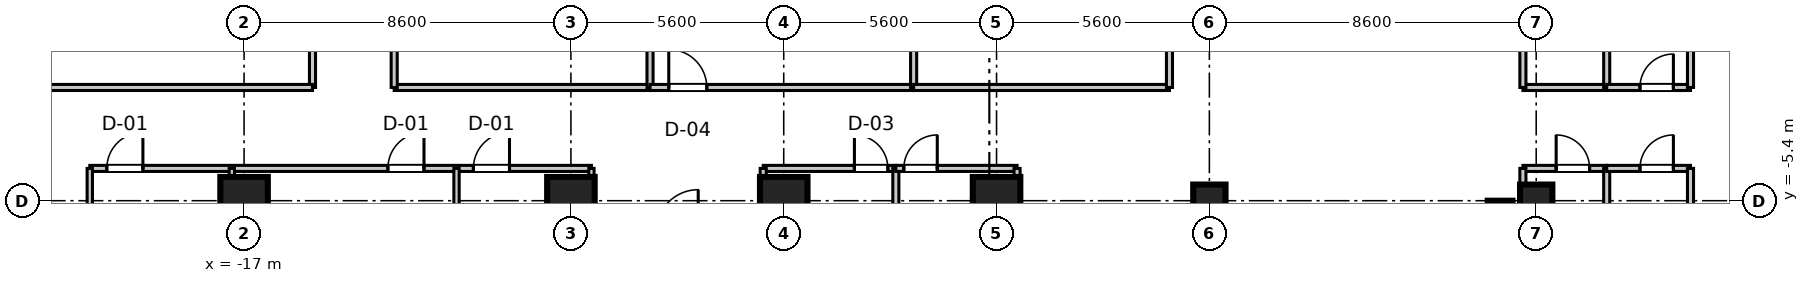
"""IFC4 building model, lengths in metres.
Left out: names, types, materials, properties, quantities, classifications, styles, units other than length and angle.
Written with IfcOpenShell. Run it as: python <this file> out.ifc"""

import sys

from ifc_helpers import new_model, si_unit, direction, frame, frame_2d, origin, origin_2d, place, context, subcontext, project, spatial, rectangle, extrude, source, transform, mapped, element, fill, save


model = new_model("IFC4")
c1 = context("Model", 3, precision=1e-05, world=origin(), true_north=direction((0.0, 1.0)))
c2 = subcontext(c1, "Body", "Model", "MODEL_VIEW")
j1 = project(units=[si_unit("LENGTHUNIT", "METRE"), si_unit("PLANEANGLEUNIT", "RADIAN")], contexts=[c1])
p1 = place(None, origin())
s1 = spatial("IfcSite", under=j1, at=p1, CompositionType="ELEMENT")
p2 = place(p1, origin())
s2 = spatial("IfcBuilding", under=s1, at=p2, CompositionType="ELEMENT")
p3 = place(p2, frame((0.0, 0.0, 102.9)))
s3 = spatial("IfcBuildingStorey", under=s2, at=p3, CompositionType="ELEMENT", Elevation=102.9)
m1 = source(origin(), c2, "Body", "SweptSolid", [
    extrude(rectangle(XDim=1.25, YDim=1.25, at=origin_2d()), origin(), (0.0, 0.0, 1.0), 3.605),
])
for number, where, z_axis, x_axis in (
    (1, (-17.0, -5.4, 0.0), (0.0, 0.0, 1.0), (1.0, 0.0, 0.0)),
    (2, (-8.4, -5.4, 0.0), (0.0, 0.0, 1.0), (1.0, 0.0, 0.0)),
    (3, (-2.8, -5.4, 0.0), (0.0, 0.0, 1.0), (1.0, 0.0, 0.0)),
    (4, (2.8, -5.4, 0.0), (0.0, 0.0, 1.0), (1.0, 0.0, 0.0)),
):
    element("IfcColumn", number, at=place(p3, frame(where, z_axis=z_axis, x_axis=x_axis)), inside=s3, PredefinedType="COLUMN", context=c2, shape_type="MappedRepresentation", body=[
        mapped(m1, transform((0.0, 0.0, 0.0), scale=1.0)),
    ])
m2 = source(origin(), c2, "Body", "SweptSolid", [
    extrude(rectangle(XDim=0.85, YDim=0.85, at=origin_2d()), origin(), (0.0, 0.0, 1.0), 3.605),
])
for number, where, z_axis, x_axis in (
    (5, (8.4, -5.4, 0.0), (0.0, 0.0, 1.0), (1.0, 0.0, 0.0)),
    (6, (17.0, -5.4, 0.0), (0.0, 0.0, 1.0), (1.0, 0.0, 0.0)),
):
    element("IfcColumn", number, at=place(p3, frame(where, z_axis=z_axis, x_axis=x_axis)), inside=s3, PredefinedType="PILASTER", context=c2, shape_type="MappedRepresentation", body=[
        mapped(m2, transform((0.0, 0.0, 0.0), scale=1.0)),
    ])
m3 = source(origin(), c2, "Body", "SweptSolid", [
    extrude(rectangle(XDim=11.6, YDim=0.65, at=frame_2d((5.8, 0.0))), origin(), (0.0, 0.0, 1.0), 3.38),
])
p4 = place(p3, frame((16.05, -17.0, 0.0), z_axis=(0.0, 0.0, 1.0), x_axis=(0.0, 1.0, 0.0)))
e7 = element("IfcWall", 7, at=p4, inside=s3, PredefinedType="SHEAR", context=c2, shape_type="MappedRepresentation", body=[
    mapped(m3, transform((0.0, 0.0, 0.0), scale=1.0)),
])
m4 = source(origin(), c2, "Body", "SweptSolid", [
    extrude(rectangle(XDim=2.205, YDim=0.16, at=frame_2d((1.103, 0.0))), origin(), (0.0, 0.0, 1.0), 2.72),
])
p5 = place(p3, frame((16.65, -4.55, 0.0), z_axis=(0.0, 0.0, 1.0), x_axis=(1.0, 0.0, 0.0)))
e8 = element("IfcWall", 8, at=p5, inside=s3, PredefinedType="PARTITIONING", context=c2, shape_type="MappedRepresentation", body=[
    mapped(m4, transform((0.0, 0.0, 0.0), scale=1.0)),
])
p6 = place(p5, frame((0.875, 0.0, 0.0)))
e9 = element("IfcOpeningElement", 9, at=p6, cuts=e8, PredefinedType="OPENING", context=c2, shape_type="SweptSolid", body=[
    extrude(rectangle(XDim=0.88, YDim=2.1, at=frame_2d((0.44, 1.05))), frame((0.0, 0.09, 0.0), z_axis=(0.0, -1.0, 0.0), x_axis=(1.0, 0.0, 0.0)), (0.0, 0.0, 1.0), 0.18),
])
m5 = source(origin(), c2, "Body", "SweptSolid", [
    extrude(rectangle(XDim=19.25, YDim=0.16, at=frame_2d((9.625, 0.0))), origin(), (0.0, 0.0, 1.0), 2.72),
])
for number, where, z_axis, x_axis in (
    (10, (16.65, -23.8, 0.0), (0.0, 0.0, 1.0), (0.0, 1.0, 0.0)),
    (11, (18.855, -23.8, 0.0), (0.0, 0.0, 1.0), (0.0, 1.0, 0.0)),
):
    element("IfcWall", number, at=place(p3, frame(where, z_axis=z_axis, x_axis=x_axis)), inside=s3, PredefinedType="PARTITIONING", context=c2, shape_type="MappedRepresentation", body=[
        mapped(m5, transform((0.0, 0.0, 0.0), scale=1.0)),
    ])
p7 = place(p3, frame((18.855, -4.55, 0.0), z_axis=(0.0, 0.0, 1.0), x_axis=(1.0, 0.0, 0.0)))
e12 = element("IfcWall", 12, at=p7, inside=s3, PredefinedType="PARTITIONING", context=c2, shape_type="MappedRepresentation", body=[
    mapped(m4, transform((0.0, 0.0, 0.0), scale=1.0)),
])
p8 = place(p7, frame((0.875, 0.0, 0.0)))
e13 = element("IfcOpeningElement", 13, at=p8, cuts=e12, PredefinedType="OPENING", context=c2, shape_type="SweptSolid", body=[
    extrude(rectangle(XDim=0.88, YDim=2.1, at=frame_2d((0.44, 1.05))), frame((0.0, 0.09, 0.0), z_axis=(0.0, -1.0, 0.0), x_axis=(1.0, 0.0, 0.0)), (0.0, 0.0, 1.0), 0.18),
])
m6 = source(origin(), c2, "Body", "SweptSolid", [
    extrude(rectangle(XDim=17.83, YDim=0.16, at=frame_2d((8.915, 0.0))), origin(), (0.0, 0.0, 1.0), 2.72),
])
p9 = place(p3, frame((21.06, -22.38, 0.0), z_axis=(0.0, 0.0, 1.0), x_axis=(0.0, 1.0, 0.0)))
e14 = element("IfcWall", 14, at=p9, inside=s3, PredefinedType="PARTITIONING", context=c2, shape_type="MappedRepresentation", body=[
    mapped(m6, transform((0.0, 0.0, 0.0), scale=1.0)),
])
m7 = source(origin(), c2, "Body", "SweptSolid", [
    extrude(rectangle(XDim=13.2, YDim=0.16, at=frame_2d((6.6, 0.0))), origin(), (0.0, 0.0, 1.0), 2.72),
])
p10 = place(p3, frame((-21.06, -4.55, 0.0), z_axis=(0.0, 0.0, 1.0), x_axis=(1.0, 0.0, 0.0)))
e15 = element("IfcWall", 15, at=p10, inside=s3, PredefinedType="PARTITIONING", context=c2, shape_type="MappedRepresentation", body=[
    mapped(m7, transform((0.0, 0.0, 0.0), scale=1.0)),
])
p11 = place(p10, frame((0.448, 0.0, 0.0)))
e16 = element("IfcOpeningElement", 16, at=p11, cuts=e15, PredefinedType="OPENING", context=c2, shape_type="SweptSolid", body=[
    extrude(rectangle(XDim=0.95, YDim=2.1, at=frame_2d((0.475, 1.05))), frame((0.0, 0.09, 0.0), z_axis=(0.0, -1.0, 0.0), x_axis=(1.0, 0.0, 0.0)), (0.0, 0.0, 1.0), 0.18),
])
p12 = place(p10, frame((7.844, 0.0, 0.0)))
e17 = element("IfcOpeningElement", 17, at=p12, cuts=e15, PredefinedType="OPENING", context=c2, shape_type="SweptSolid", body=[
    extrude(rectangle(XDim=0.95, YDim=2.1, at=frame_2d((0.475, 1.05))), frame((0.0, 0.09, 0.0), z_axis=(0.0, -1.0, 0.0), x_axis=(1.0, 0.0, 0.0)), (0.0, 0.0, 1.0), 0.18),
])
p13 = place(p10, frame((10.094, 0.0, 0.0)))
e18 = element("IfcOpeningElement", 18, at=p13, cuts=e15, PredefinedType="OPENING", context=c2, shape_type="SweptSolid", body=[
    extrude(rectangle(XDim=0.95, YDim=2.1, at=frame_2d((0.475, 1.05))), frame((0.0, 0.09, 0.0), z_axis=(0.0, -1.0, 0.0), x_axis=(1.0, 0.0, 0.0)), (0.0, 0.0, 1.0), 0.18),
])
m8 = source(origin(), c2, "Body", "SweptSolid", [
    extrude(rectangle(XDim=17.83, YDim=0.14, at=frame_2d((8.915, 0.0))), origin(), (0.0, 0.0, 1.0), 2.72),
])
p14 = place(p3, frame((-21.06, -22.38, 0.0), z_axis=(0.0, 0.0, 1.0), x_axis=(0.0, 1.0, 0.0)))
e19 = element("IfcWall", 19, at=p14, inside=s3, PredefinedType="PARTITIONING", context=c2, shape_type="MappedRepresentation", body=[
    mapped(m8, transform((0.0, 0.0, 0.0), scale=1.0)),
])
m9 = source(origin(), c2, "Body", "SweptSolid", [
    extrude(rectangle(XDim=19.25, YDim=0.14, at=frame_2d((9.625, 0.0))), origin(), (0.0, 0.0, 1.0), 2.72),
])
for number, where, z_axis, x_axis in (
    (20, (-7.86, -23.8, 0.0), (0.0, 0.0, 1.0), (0.0, 1.0, 0.0)),
    (21, (-17.322, -23.8, 0.0), (0.0, 0.0, 1.0), (0.0, 1.0, 0.0)),
    (22, (-11.41, -23.8, 0.0), (0.0, 0.0, 1.0), (0.0, 1.0, 0.0)),
):
    element("IfcWall", number, at=place(p3, frame(where, z_axis=z_axis, x_axis=x_axis)), inside=s3, PredefinedType="PARTITIONING", context=c2, shape_type="MappedRepresentation", body=[
        mapped(m9, transform((0.0, 0.0, 0.0), scale=1.0)),
    ])
m10 = source(origin(), c2, "Body", "SweptSolid", [
    extrude(rectangle(XDim=3.49, YDim=0.16, at=frame_2d((1.745, 0.0))), origin(), (0.0, 0.0, 1.0), 2.72),
])
p15 = place(p3, frame((-3.34, -4.55, 0.0), z_axis=(0.0, 0.0, 1.0), x_axis=(1.0, 0.0, 0.0)))
e23 = element("IfcWall", 23, at=p15, inside=s3, PredefinedType="PARTITIONING", context=c2, shape_type="MappedRepresentation", body=[
    mapped(m10, transform((0.0, 0.0, 0.0), scale=1.0)),
])
p16 = place(p15, frame((2.4, 0.0, 0.0)))
e24 = element("IfcOpeningElement", 24, at=p16, cuts=e23, PredefinedType="OPENING", context=c2, shape_type="SweptSolid", body=[
    extrude(rectangle(XDim=0.88, YDim=2.1, at=frame_2d((0.44, 1.05))), frame((0.0, 0.09, 0.0), z_axis=(0.0, -1.0, 0.0), x_axis=(1.0, 0.0, 0.0)), (0.0, 0.0, 1.0), 0.18),
])
for number, where, z_axis, x_axis in (
    (25, (-3.34, -23.8, 0.0), (0.0, 0.0, 1.0), (0.0, 1.0, 0.0)),
    (26, (0.15, -23.8, 0.0), (0.0, 0.0, 1.0), (0.0, 1.0, 0.0)),
):
    element("IfcWall", number, at=place(p3, frame(where, z_axis=z_axis, x_axis=x_axis)), inside=s3, PredefinedType="PARTITIONING", context=c2, shape_type="MappedRepresentation", body=[
        mapped(m5, transform((0.0, 0.0, 0.0), scale=1.0)),
    ])
m11 = source(origin(), c2, "Body", "SweptSolid", [
    extrude(rectangle(XDim=3.19, YDim=0.16, at=frame_2d((1.595, 0.0))), origin(), (0.0, 0.0, 1.0), 2.72),
])
p17 = place(p3, frame((0.15, -4.55, 0.0), z_axis=(0.0, 0.0, 1.0), x_axis=(1.0, 0.0, 0.0)))
e27 = element("IfcWall", 27, at=p17, inside=s3, PredefinedType="PARTITIONING", context=c2, shape_type="MappedRepresentation", body=[
    mapped(m11, transform((0.0, 0.0, 0.0), scale=1.0)),
])
p18 = place(p17, frame((0.21, 0.0, 0.0)))
e28 = element("IfcOpeningElement", 28, at=p18, cuts=e27, PredefinedType="OPENING", context=c2, shape_type="SweptSolid", body=[
    extrude(rectangle(XDim=0.88, YDim=2.1, at=frame_2d((0.44, 1.05))), frame((0.0, 0.09, 0.0), z_axis=(0.0, -1.0, 0.0), x_axis=(1.0, 0.0, 0.0)), (0.0, 0.0, 1.0), 0.18),
])
p19 = place(p3, frame((3.34, -23.8, 0.0), z_axis=(0.0, 0.0, 1.0), x_axis=(0.0, 1.0, 0.0)))
e29 = element("IfcWall", 29, at=p19, inside=s3, PredefinedType="PARTITIONING", context=c2, shape_type="MappedRepresentation", body=[
    mapped(m5, transform((0.0, 0.0, 0.0), scale=1.0)),
])
m12 = source(origin(), c2, "Body", "SweptSolid", [
    extrude(rectangle(XDim=4.84, YDim=0.16, at=frame_2d((2.42, 0.0))), origin(), (0.0, 0.0, 1.0), 2.72),
])
p20 = place(p3, frame((-15.2, -2.42, 0.0), z_axis=(0.0, 0.0, 1.0), x_axis=(0.0, 1.0, 0.0)))
e30 = element("IfcWall", 30, at=p20, inside=s3, PredefinedType="PARTITIONING", context=c2, shape_type="MappedRepresentation", body=[
    mapped(m12, transform((0.0, 0.0, 0.0), scale=1.0)),
])
m13 = source(origin(), c2, "Body", "SweptSolid", [
    extrude(rectangle(XDim=8.6, YDim=0.16, at=frame_2d((4.3, 0.0))), origin(), (0.0, 0.0, 1.0), 2.72),
])
p21 = place(p3, frame((-23.8, -2.42, 0.0), z_axis=(0.0, 0.0, 1.0), x_axis=(1.0, 0.0, 0.0)))
e31 = element("IfcWall", 31, at=p21, inside=s3, PredefinedType="PARTITIONING", context=c2, shape_type="MappedRepresentation", body=[
    mapped(m13, transform((0.0, 0.0, 0.0), scale=1.0)),
])
m14 = source(origin(), c2, "Body", "SweptSolid", [
    extrude(rectangle(XDim=6.732, YDim=0.16, at=frame_2d((3.366, 0.0))), origin(), (0.0, 0.0, 1.0), 2.72),
])
p22 = place(p3, frame((-13.05, -2.42, 0.0), z_axis=(0.0, 0.0, 1.0), x_axis=(1.0, 0.0, 0.0)))
e32 = element("IfcWall", 32, at=p22, inside=s3, PredefinedType="PARTITIONING", context=c2, shape_type="MappedRepresentation", body=[
    mapped(m14, transform((0.0, 0.0, 0.0), scale=1.0)),
])
for number, where, z_axis, x_axis in (
    (33, (-13.05, -2.42, 0.0), (0.0, 0.0, 1.0), (0.0, 1.0, 0.0)),
    (34, (-6.318, -2.42, 0.0), (0.0, 0.0, 1.0), (0.0, 1.0, 0.0)),
):
    element("IfcWall", number, at=place(p3, frame(where, z_axis=z_axis, x_axis=x_axis)), inside=s3, PredefinedType="PARTITIONING", context=c2, shape_type="MappedRepresentation", body=[
        mapped(m12, transform((0.0, 0.0, 0.0), scale=1.0)),
    ])
m15 = source(origin(), c2, "Body", "SweptSolid", [
    extrude(rectangle(XDim=6.936, YDim=0.16, at=frame_2d((3.468, 0.0))), origin(), (0.0, 0.0, 1.0), 2.72),
])
p23 = place(p3, frame((-6.318, -2.42, 0.0), z_axis=(0.0, 0.0, 1.0), x_axis=(1.0, 0.0, 0.0)))
e35 = element("IfcWall", 35, at=p23, inside=s3, PredefinedType="PARTITIONING", context=c2, shape_type="MappedRepresentation", body=[
    mapped(m15, transform((0.0, 0.0, 0.0), scale=1.0)),
])
p24 = place(p23, frame((0.493, 0.0, 0.0)))
e36 = element("IfcOpeningElement", 36, at=p24, cuts=e35, PredefinedType="OPENING", context=c2, shape_type="SweptSolid", body=[
    extrude(rectangle(XDim=1.0, YDim=2.1, at=frame_2d((0.5, 1.05))), frame((0.0, 0.09, 0.0), z_axis=(0.0, -1.0, 0.0), x_axis=(1.0, 0.0, 0.0)), (0.0, 0.0, 1.0), 0.18),
])
p25 = place(p3, frame((0.618, -2.42, 0.0), z_axis=(0.0, 0.0, 1.0), x_axis=(0.0, 1.0, 0.0)))
e37 = element("IfcWall", 37, at=p25, inside=s3, PredefinedType="PARTITIONING", context=c2, shape_type="MappedRepresentation", body=[
    mapped(m12, transform((0.0, 0.0, 0.0), scale=1.0)),
])
m16 = source(origin(), c2, "Body", "SweptSolid", [
    extrude(rectangle(XDim=6.732, YDim=0.16, at=frame_2d((3.366, 0.0))), origin(), (0.0, 0.0, 1.0), 2.72),
])
p26 = place(p3, frame((0.618, -2.42, 0.0), z_axis=(0.0, 0.0, 1.0), x_axis=(1.0, 0.0, 0.0)))
e38 = element("IfcWall", 38, at=p26, inside=s3, PredefinedType="PARTITIONING", context=c2, shape_type="MappedRepresentation", body=[
    mapped(m16, transform((0.0, 0.0, 0.0), scale=1.0)),
])
p27 = place(p3, frame((7.35, -2.42, 0.0), z_axis=(0.0, 0.0, 1.0), x_axis=(0.0, 1.0, 0.0)))
e39 = element("IfcWall", 39, at=p27, inside=s3, PredefinedType="PARTITIONING", context=c2, shape_type="MappedRepresentation", body=[
    mapped(m12, transform((0.0, 0.0, 0.0), scale=1.0)),
])
p28 = place(p3, frame((16.65, -2.42, 0.0), z_axis=(0.0, 0.0, 1.0), x_axis=(1.0, 0.0, 0.0)))
e40 = element("IfcWall", 40, at=p28, inside=s3, PredefinedType="PARTITIONING", context=c2, shape_type="MappedRepresentation", body=[
    mapped(m4, transform((0.0, 0.0, 0.0), scale=1.0)),
])
for number, where, z_axis, x_axis in (
    (41, (16.65, -2.42, 0.0), (0.0, 0.0, 1.0), (0.0, 1.0, 0.0)),
    (42, (18.855, -2.42, 0.0), (0.0, 0.0, 1.0), (0.0, 1.0, 0.0)),
):
    element("IfcWall", number, at=place(p3, frame(where, z_axis=z_axis, x_axis=x_axis)), inside=s3, PredefinedType="PARTITIONING", context=c2, shape_type="MappedRepresentation", body=[
        mapped(m12, transform((0.0, 0.0, 0.0), scale=1.0)),
    ])
p29 = place(p3, frame((18.855, -2.42, 0.0), z_axis=(0.0, 0.0, 1.0), x_axis=(1.0, 0.0, 0.0)))
e43 = element("IfcWall", 43, at=p29, inside=s3, PredefinedType="PARTITIONING", context=c2, shape_type="MappedRepresentation", body=[
    mapped(m4, transform((0.0, 0.0, 0.0), scale=1.0)),
])
p30 = place(p29, frame((0.875, 0.0, 0.0)))
e44 = element("IfcOpeningElement", 44, at=p30, cuts=e43, PredefinedType="OPENING", context=c2, shape_type="SweptSolid", body=[
    extrude(rectangle(XDim=0.88, YDim=2.1, at=frame_2d((0.44, 1.05))), frame((0.0, 0.09, 0.0), z_axis=(0.0, -1.0, 0.0), x_axis=(1.0, 0.0, 0.0)), (0.0, 0.0, 1.0), 0.18),
])
p31 = place(p3, frame((21.06, -2.42, 0.0), z_axis=(0.0, 0.0, 1.0), x_axis=(0.0, 1.0, 0.0)))
e45 = element("IfcWall", 45, at=p31, inside=s3, PredefinedType="PARTITIONING", context=c2, shape_type="MappedRepresentation", body=[
    mapped(m12, transform((0.0, 0.0, 0.0), scale=1.0)),
])
m17 = source(origin(), c2, "Body", "SweptSolid", [
    extrude(rectangle(XDim=0.88, YDim=2.1, at=frame_2d((0.44, 1.05))), frame((0.0, 0.025, 0.0), z_axis=(0.0, -1.0, 0.0), x_axis=(1.0, 0.0, 0.0)), (0.0, 0.0, 1.0), 0.05),
])
p32 = place(p6, frame((0.88, 0.0, 0.0), z_axis=(0.0, 0.0, 1.0), x_axis=(-1.0, 0.0, 0.0)))
e46 = element("IfcDoor", 46, at=p32, inside=s3, OperationType="SINGLE_SWING_LEFT", PredefinedType="DOOR", context=c2, shape_type="MappedRepresentation", body=[
    mapped(m17, transform((0.0, 0.0, 0.0), scale=1.0)),
])
fill(e9, e46)
p33 = place(p8, frame((0.88, 0.0, 0.0), z_axis=(0.0, 0.0, 1.0), x_axis=(-1.0, 0.0, 0.0)))
e47 = element("IfcDoor", 47, at=p33, inside=s3, OperationType="SINGLE_SWING_RIGHT", PredefinedType="DOOR", context=c2, shape_type="MappedRepresentation", body=[
    mapped(m17, transform((0.0, 0.0, 0.0), scale=1.0)),
])
fill(e13, e47)
m18 = source(origin(), c2, "Body", "SweptSolid", [
    extrude(rectangle(XDim=0.95, YDim=2.1, at=frame_2d((0.475, 1.05))), frame((0.0, 0.025, 0.0), z_axis=(0.0, -1.0, 0.0), x_axis=(1.0, 0.0, 0.0)), (0.0, 0.0, 1.0), 0.05),
])
p34 = place(p11, frame((0.95, 0.0, 0.0), z_axis=(0.0, 0.0, 1.0), x_axis=(-1.0, 0.0, 0.0)))
e48 = element("IfcDoor", 48, at=p34, inside=s3, OperationType="SINGLE_SWING_RIGHT", PredefinedType="DOOR", context=c2, shape_type="MappedRepresentation", body=[
    mapped(m18, transform((0.0, 0.0, 0.0), scale=1.0)),
])
fill(e16, e48)
p35 = place(p12, frame((0.95, 0.0, 0.0), z_axis=(0.0, 0.0, 1.0), x_axis=(-1.0, 0.0, 0.0)))
e49 = element("IfcDoor", 49, at=p35, inside=s3, OperationType="SINGLE_SWING_RIGHT", PredefinedType="DOOR", context=c2, shape_type="MappedRepresentation", body=[
    mapped(m18, transform((0.0, 0.0, 0.0), scale=1.0)),
])
fill(e17, e49)
p36 = place(p13, frame((0.95, 0.0, 0.0), z_axis=(0.0, 0.0, 1.0), x_axis=(-1.0, 0.0, 0.0)))
e50 = element("IfcDoor", 50, at=p36, inside=s3, OperationType="SINGLE_SWING_RIGHT", PredefinedType="DOOR", context=c2, shape_type="MappedRepresentation", body=[
    mapped(m18, transform((0.0, 0.0, 0.0), scale=1.0)),
])
fill(e18, e50)
p37 = place(p16, frame((0.88, 0.0, 0.0), z_axis=(0.0, 0.0, 1.0), x_axis=(-1.0, 0.0, 0.0)))
e51 = element("IfcDoor", 51, at=p37, inside=s3, OperationType="SINGLE_SWING_LEFT", PredefinedType="DOOR", context=c2, shape_type="MappedRepresentation", body=[
    mapped(m17, transform((0.0, 0.0, 0.0), scale=1.0)),
])
fill(e24, e51)
p38 = place(p18, frame((0.88, 0.0, 0.0), z_axis=(0.0, 0.0, 1.0), x_axis=(-1.0, 0.0, 0.0)))
e52 = element("IfcDoor", 52, at=p38, inside=s3, OperationType="SINGLE_SWING_RIGHT", PredefinedType="DOOR", context=c2, shape_type="MappedRepresentation", body=[
    mapped(m17, transform((0.0, 0.0, 0.0), scale=1.0)),
])
fill(e28, e52)
m19 = source(origin(), c2, "Body", "SweptSolid", [
    extrude(rectangle(XDim=1.0, YDim=2.1, at=frame_2d((0.5, 1.05))), frame((0.0, 0.025, 0.0), z_axis=(0.0, -1.0, 0.0), x_axis=(1.0, 0.0, 0.0)), (0.0, 0.0, 1.0), 0.05),
])
p39 = place(p24, origin())
e53 = element("IfcDoor", 53, at=p39, inside=s3, OperationType="SINGLE_SWING_LEFT", PredefinedType="DOOR", context=c2, shape_type="MappedRepresentation", body=[
    mapped(m19, transform((0.0, 0.0, 0.0), scale=1.0)),
])
fill(e36, e53)
p40 = place(p30, origin())
e54 = element("IfcDoor", 54, at=p40, inside=s3, OperationType="SINGLE_SWING_RIGHT", PredefinedType="DOOR", context=c2, shape_type="MappedRepresentation", body=[
    mapped(m17, transform((0.0, 0.0, 0.0), scale=1.0)),
])
fill(e44, e54)
save(model, sys.argv[1])
